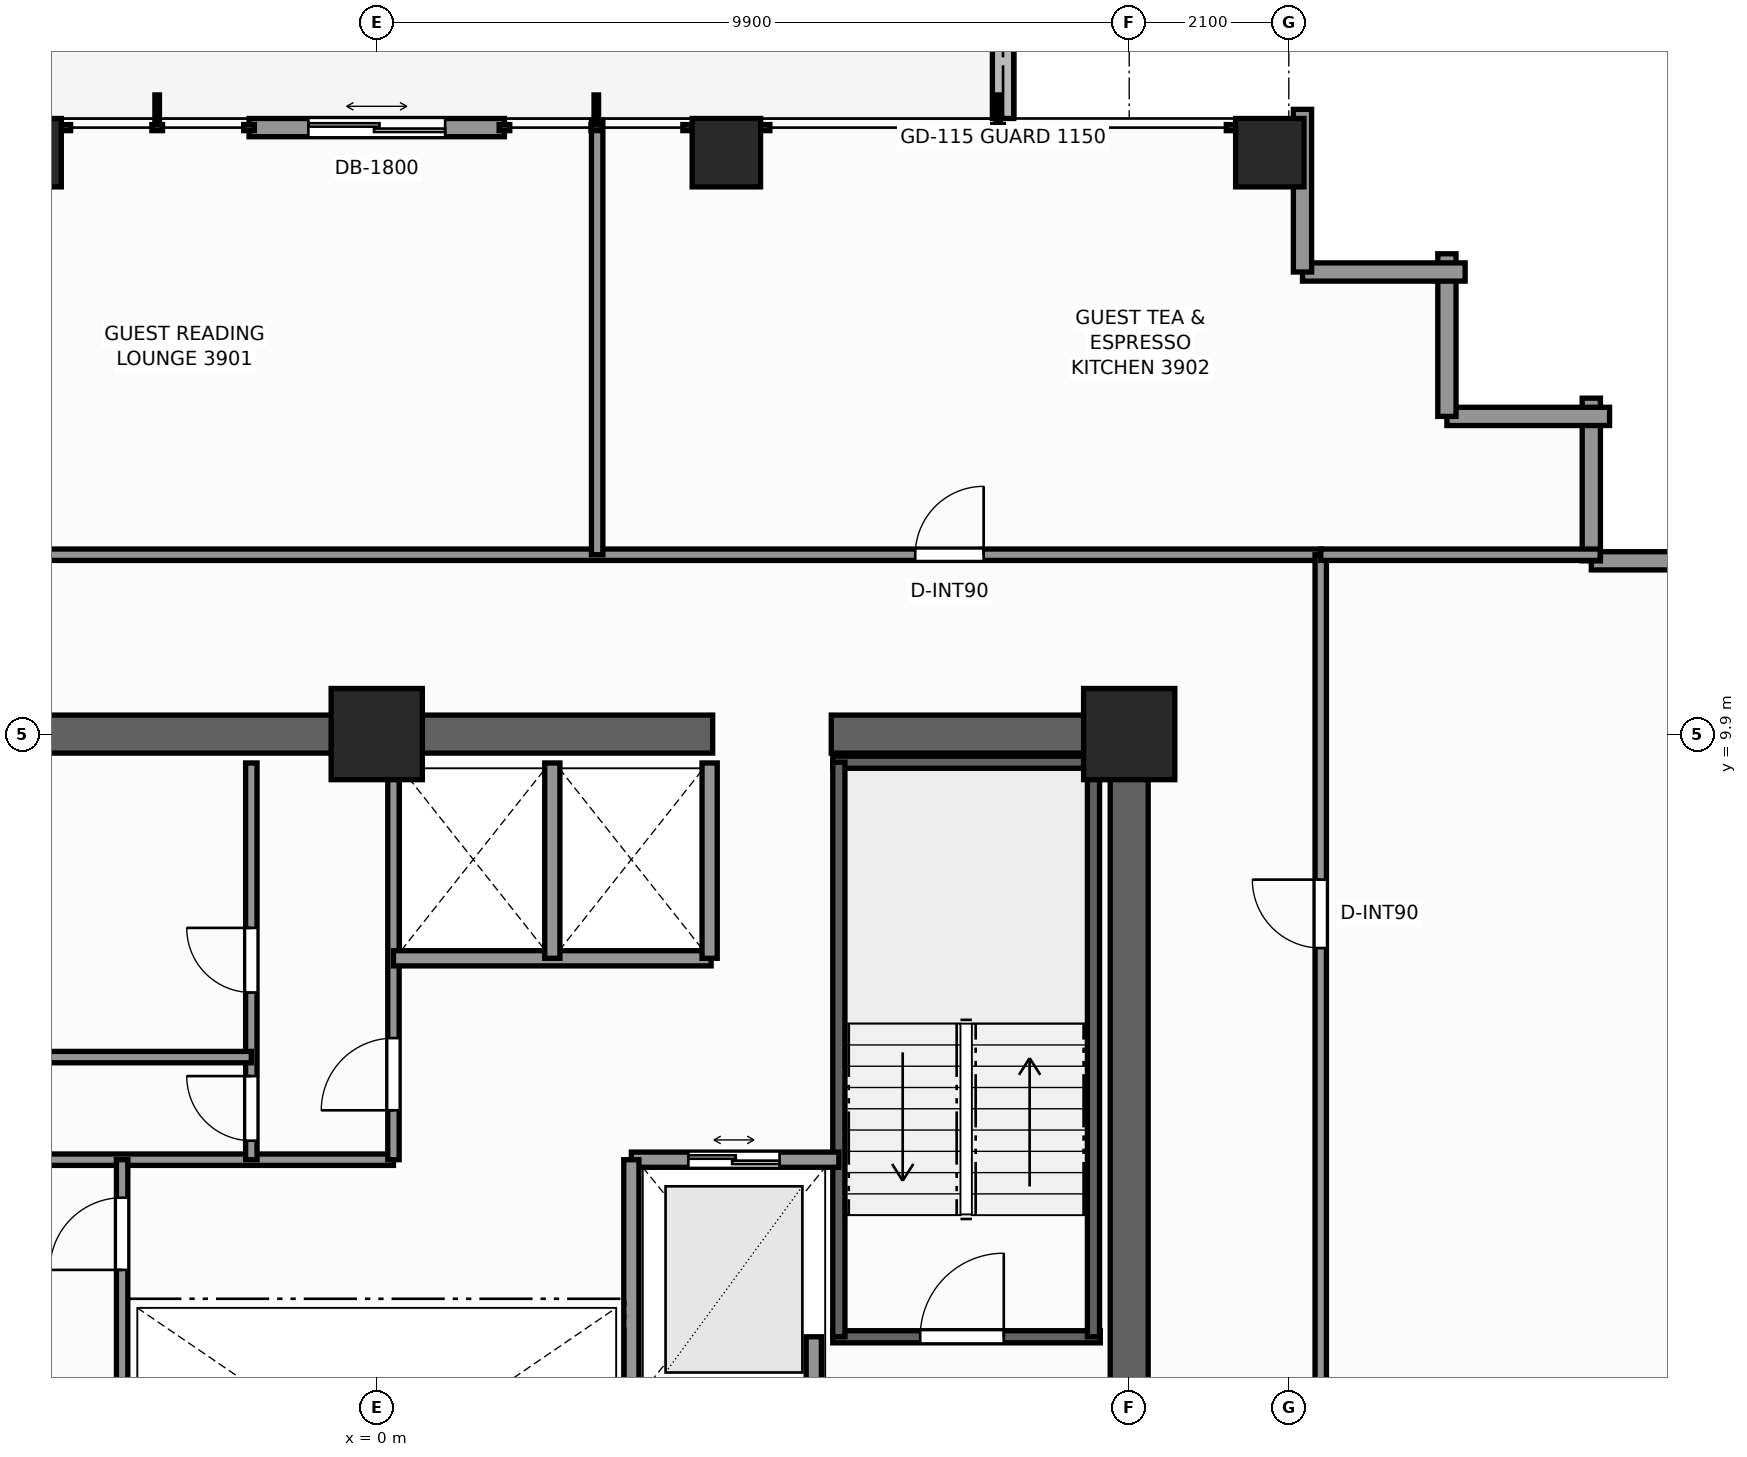
"""IFC4 building model, lengths in metres.
Left out: names, types, materials, properties, quantities, classifications, styles, units other than length and angle.
Written with IfcOpenShell. Run it as: python <this file> out.ifc"""

import sys

from ifc_helpers import new_model, si_unit, direction, frame, frame_2d, origin, origin_2d, place, context, subcontext, project, spatial, rectangle, extrude, element, fill, save


model = new_model("IFC4")
c1 = context("Model", 3, precision=1e-05, world=origin(), true_north=direction((0.0, 1.0)))
c2 = subcontext(c1, "Body", "Model", "MODEL_VIEW")
j1 = project(units=[si_unit("LENGTHUNIT", "METRE"), si_unit("PLANEANGLEUNIT", "RADIAN")], contexts=[c1])
p1 = place(None, origin())
s1 = spatial("IfcSite", under=j1, at=p1, CompositionType="ELEMENT")
p2 = place(p1, origin())
s2 = spatial("IfcBuilding", under=s1, at=p2, CompositionType="ELEMENT")
p3 = place(p2, frame((0.0, 0.0, 134.9)))
s3 = spatial("IfcBuildingStorey", under=s2, at=p3, CompositionType="ELEMENT", Elevation=134.9)
p4 = place(p3, frame((-10.15, 9.9, 0.0), z_axis=(0.0, 0.0, 1.0), x_axis=(1.0, 0.0, 0.0)))
e1 = element("IfcWall", 1, at=p4, inside=s3, PredefinedType="SHEAR", context=c2, shape_type="SweptSolid", body=[
    extrude(rectangle(XDim=14.57, YDim=0.5, at=frame_2d((7.285, 0.0))), origin(), (0.0, 0.0, 1.0), 3.3),
])
p5 = place(p3, frame((5.98, 9.9, 0.0), z_axis=(0.0, 0.0, 1.0), x_axis=(1.0, 0.0, 0.0)))
e2 = element("IfcWall", 2, at=p5, inside=s3, PredefinedType="SHEAR", context=c2, shape_type="SweptSolid", body=[
    extrude(rectangle(XDim=4.17, YDim=0.5, at=frame_2d((2.085, 0.0))), origin(), (0.0, 0.0, 1.0), 3.3),
])
p6 = place(p3, frame((9.9, -3.7, 0.0), z_axis=(0.0, 0.0, 1.0), x_axis=(0.0, 1.0, 0.0)))
e3 = element("IfcWall", 3, at=p6, inside=s3, PredefinedType="SHEAR", context=c2, shape_type="SweptSolid", body=[
    extrude(rectangle(XDim=13.35, YDim=0.5, at=frame_2d((6.675, 0.0))), origin(), (0.0, 0.0, 1.0), 3.3),
])
p7 = place(p6, frame((0.35, 0.0, 0.0)))
e4 = element("IfcOpeningElement", 4, at=p7, cuts=e3, PredefinedType="OPENING", context=c2, shape_type="SweptSolid", body=[
    extrude(rectangle(XDim=1.1, YDim=2.2, at=frame_2d((0.55, 1.1))), frame((0.0, 0.26, 0.0), z_axis=(0.0, -1.0, 0.0), x_axis=(1.0, 0.0, 0.0)), (0.0, 0.0, 1.0), 0.52),
])
for number, where, z_axis, x_axis in (
    (5, (9.9, 9.9, 0.0), (0.0, 0.0, 1.0), (1.0, 0.0, 0.0)),
    (6, (0.0, 9.9, 0.0), (0.0, 0.0, 1.0), (1.0, 0.0, 0.0)),
):
    element("IfcColumn", number, at=place(p3, frame(where, z_axis=z_axis, x_axis=x_axis)), inside=s3, PredefinedType="COLUMN", context=c2, shape_type="SweptSolid", body=[
        extrude(rectangle(XDim=1.2, YDim=1.2, at=origin_2d()), origin(), (0.0, 0.0, 1.0), 3.3),
    ])
for number, where, z_axis, x_axis in (
    (7, (-4.6, 17.55, 0.0), (0.0, 0.0, 1.0), (1.0, 0.0, 0.0)),
    (8, (4.6, 17.55, 0.0), (0.0, 0.0, 1.0), (1.0, 0.0, 0.0)),
    (9, (11.75, 17.55, 0.0), (0.0, 0.0, 1.0), (1.0, 0.0, 0.0)),
):
    element("IfcColumn", number, at=place(p3, frame(where, z_axis=z_axis, x_axis=x_axis)), inside=s3, PredefinedType="COLUMN", context=c2, shape_type="SweptSolid", body=[
        extrude(rectangle(XDim=0.9, YDim=0.9, at=origin_2d()), origin(), (0.0, 0.0, 1.0), 3.3),
    ])
p8 = place(p3, frame((8.24, 18.0, -0.02), z_axis=(0.0, 0.0, 1.0), x_axis=(0.0, 1.0, 0.0)))
e10 = element("IfcWall", 10, at=p8, inside=s3, PredefinedType="PARAPET", context=c2, shape_type="SweptSolid", body=[
    extrude(rectangle(XDim=2.975, YDim=0.28, at=frame_2d((1.487, 0.0))), origin(), (0.0, 0.0, 1.0), 0.42),
])
for number, where, z_axis, x_axis in (
    (11, (15.98, 12.18, 0.0), (0.0, 0.0, 1.0), (1.0, 0.0, 0.0)),
    (12, (15.98, 14.32, 0.0), (0.0, 0.0, 1.0), (0.0, -1.0, 0.0)),
):
    element("IfcWall", number, at=place(p3, frame(where, z_axis=z_axis, x_axis=x_axis)), inside=s3, PredefinedType="STANDARD", context=c2, shape_type="SweptSolid", body=[
        extrude(rectangle(XDim=2.14, YDim=0.24, at=frame_2d((1.07, 0.0))), origin(), (0.0, 0.0, 1.0), 2.479),
    ])
for number, where, z_axis, x_axis in (
    (13, (14.08, 14.08, 0.0), (0.0, 0.0, 1.0), (1.0, 0.0, 0.0)),
    (14, (14.08, 16.22, 0.0), (0.0, 0.0, 1.0), (0.0, -1.0, 0.0)),
):
    element("IfcWall", number, at=place(p3, frame(where, z_axis=z_axis, x_axis=x_axis)), inside=s3, PredefinedType="STANDARD", context=c2, shape_type="SweptSolid", body=[
        extrude(rectangle(XDim=2.14, YDim=0.24, at=frame_2d((1.07, 0.0))), origin(), (0.0, 0.0, 1.0), 2.479),
    ])
for number, where, z_axis, x_axis in (
    (15, (12.18, 15.98, 0.0), (0.0, 0.0, 1.0), (1.0, 0.0, 0.0)),
    (16, (12.18, 18.12, 0.0), (0.0, 0.0, 1.0), (0.0, -1.0, 0.0)),
):
    element("IfcWall", number, at=place(p3, frame(where, z_axis=z_axis, x_axis=x_axis)), inside=s3, PredefinedType="STANDARD", context=c2, shape_type="SweptSolid", body=[
        extrude(rectangle(XDim=2.14, YDim=0.24, at=frame_2d((1.07, 0.0))), origin(), (0.0, 0.0, 1.0), 2.479),
    ])
p9 = place(p3, frame((-1.68, 17.88, 0.0), z_axis=(0.0, 0.0, 1.0), x_axis=(1.0, 0.0, 0.0)))
e17 = element("IfcWall", 17, at=p9, inside=s3, PredefinedType="STANDARD", context=c2, shape_type="SweptSolid", body=[
    extrude(rectangle(XDim=3.36, YDim=0.24, at=frame_2d((1.68, 0.0))), origin(), (0.0, 0.0, 1.0), 3.1),
])
p10 = place(p9, frame((0.78, 0.0, 0.0)))
e18 = element("IfcOpeningElement", 18, at=p10, cuts=e17, PredefinedType="OPENING", context=c2, shape_type="SweptSolid", body=[
    extrude(rectangle(XDim=1.8, YDim=2.2, at=frame_2d((0.9, 1.1))), frame((0.0, 0.13, 0.0), z_axis=(0.0, -1.0, 0.0), x_axis=(1.0, 0.0, 0.0)), (0.0, 0.0, 1.0), 0.26),
])
p11 = place(p3, frame((6.0, 1.97, 0.0), z_axis=(0.0, 0.0, 1.0), x_axis=(1.0, 0.0, 0.0)))
e19 = element("IfcWall", 19, at=p11, inside=s3, PredefinedType="SHEAR", context=c2, shape_type="SweptSolid", body=[
    extrude(rectangle(XDim=3.52, YDim=0.16, at=frame_2d((1.76, 0.0))), origin(), (0.0, 0.0, 1.0), 3.3),
])
p12 = place(p11, frame((1.15, 0.0, 0.0)))
e20 = element("IfcOpeningElement", 20, at=p12, cuts=e19, PredefinedType="OPENING", context=c2, shape_type="SweptSolid", body=[
    extrude(rectangle(XDim=1.1, YDim=2.2, at=frame_2d((0.55, 1.1))), frame((0.0, 0.09, 0.0), z_axis=(0.0, -1.0, 0.0), x_axis=(1.0, 0.0, 0.0)), (0.0, 0.0, 1.0), 0.18),
])
p13 = place(p3, frame((6.0, 9.53, 0.0), z_axis=(0.0, 0.0, 1.0), x_axis=(1.0, 0.0, 0.0)))
e21 = element("IfcWall", 21, at=p13, inside=s3, PredefinedType="SHEAR", context=c2, shape_type="SweptSolid", body=[
    extrude(rectangle(XDim=3.52, YDim=0.16, at=frame_2d((1.76, 0.0))), origin(), (0.0, 0.0, 1.0), 3.3),
])
for number, where, z_axis, x_axis in (
    (22, (6.08, 1.97, 0.0), (0.0, 0.0, 1.0), (0.0, 1.0, 0.0)),
    (23, (9.43, 1.97, 0.0), (0.0, 0.0, 1.0), (0.0, 1.0, 0.0)),
):
    element("IfcWall", number, at=place(p3, frame(where, z_axis=z_axis, x_axis=x_axis)), inside=s3, PredefinedType="SHEAR", context=c2, shape_type="SweptSolid", body=[
        extrude(rectangle(XDim=7.56, YDim=0.16, at=frame_2d((3.78, 0.0))), origin(), (0.0, 0.0, 1.0), 3.3),
    ])
p14 = place(p3, frame((5.75, -3.6, 0.0), z_axis=(0.0, 0.0, 1.0), x_axis=(0.0, 1.0, 0.0)))
e24 = element("IfcWall", 24, at=p14, inside=s3, PredefinedType="SOLIDWALL", context=c2, shape_type="SweptSolid", body=[
    extrude(rectangle(XDim=5.57, YDim=0.2, at=frame_2d((2.785, 0.0))), origin(), (0.0, 0.0, 1.0), 2.735),
])
p15 = place(p14, frame((2.75, 0.0, 0.0)))
e25 = element("IfcOpeningElement", 25, at=p15, cuts=e24, PredefinedType="OPENING", context=c2, shape_type="SweptSolid", body=[
    extrude(rectangle(XDim=1.1, YDim=2.2, at=frame_2d((0.55, 1.1))), frame((0.0, 0.11, 0.0), z_axis=(0.0, -1.0, 0.0), x_axis=(1.0, 0.0, 0.0)), (0.0, 0.0, 1.0), 0.22),
])
p16 = place(p3, frame((3.35, 4.3, 0.0), z_axis=(0.0, 0.0, 1.0), x_axis=(1.0, 0.0, 0.0)))
e26 = element("IfcWall", 26, at=p16, inside=s3, PredefinedType="SOLIDWALL", context=c2, shape_type="SweptSolid", body=[
    extrude(rectangle(XDim=2.73, YDim=0.2, at=frame_2d((1.365, 0.0))), origin(), (0.0, 0.0, 1.0), 3.1),
])
p17 = place(p16, frame((0.75, 0.0, 0.0)))
e27 = element("IfcOpeningElement", 27, at=p17, cuts=e26, PredefinedType="OPENING", context=c2, shape_type="SweptSolid", body=[
    extrude(rectangle(XDim=1.2, YDim=2.25, at=frame_2d((0.6, 1.125))), frame((0.0, 0.11, 0.0), z_axis=(0.0, -1.0, 0.0), x_axis=(1.0, 0.0, 0.0)), (0.0, 0.0, 1.0), 0.22),
])
p18 = place(p3, frame((3.35, 1.1, 0.0), z_axis=(0.0, 0.0, 1.0), x_axis=(0.0, 1.0, 0.0)))
e28 = element("IfcWall", 28, at=p18, inside=s3, PredefinedType="SOLIDWALL", context=c2, shape_type="SweptSolid", body=[
    extrude(rectangle(XDim=3.2, YDim=0.2, at=frame_2d((1.6, 0.0))), origin(), (0.0, 0.0, 1.0), 2.735),
])
p19 = place(p3, frame((-6.08, 4.3, 0.0), z_axis=(0.0, 0.0, 1.0), x_axis=(1.0, 0.0, 0.0)))
e29 = element("IfcWall", 29, at=p19, inside=s3, PredefinedType="PARTITIONING", context=c2, shape_type="SweptSolid", body=[
    extrude(rectangle(XDim=6.3, YDim=0.15, at=frame_2d((3.15, 0.0))), origin(), (0.0, 0.0, 1.0), 3.1),
])
p20 = place(p3, frame((0.22, 4.3, 0.0), z_axis=(0.0, 0.0, 1.0), x_axis=(0.0, 1.0, 0.0)))
e30 = element("IfcWall", 30, at=p20, inside=s3, PredefinedType="PARTITIONING", context=c2, shape_type="SweptSolid", body=[
    extrude(rectangle(XDim=5.22, YDim=0.15, at=frame_2d((2.61, 0.0))), origin(), (0.0, 0.0, 1.0), 3.1),
])
p21 = place(p20, frame((0.65, 0.0, 0.0)))
e31 = element("IfcOpeningElement", 31, at=p21, cuts=e30, PredefinedType="OPENING", context=c2, shape_type="SweptSolid", body=[
    extrude(rectangle(XDim=0.95, YDim=2.06, at=frame_2d((0.475, 1.03))), frame((0.0, 0.085, 0.0), z_axis=(0.0, -1.0, 0.0), x_axis=(1.0, 0.0, 0.0)), (0.0, 0.0, 1.0), 0.17),
])
p22 = place(p3, frame((-1.65, 4.3, 0.0), z_axis=(0.0, 0.0, 1.0), x_axis=(0.0, 1.0, 0.0)))
e32 = element("IfcWall", 32, at=p22, inside=s3, PredefinedType="PARTITIONING", context=c2, shape_type="SweptSolid", body=[
    extrude(rectangle(XDim=5.22, YDim=0.15, at=frame_2d((2.61, 0.0))), origin(), (0.0, 0.0, 1.0), 3.1),
])
p23 = place(p22, frame((2.2, 0.0, 0.0)))
e33 = element("IfcOpeningElement", 33, at=p23, cuts=e32, PredefinedType="OPENING", context=c2, shape_type="SweptSolid", body=[
    extrude(rectangle(XDim=0.85, YDim=2.03, at=frame_2d((0.425, 1.015))), frame((0.0, 0.085, 0.0), z_axis=(0.0, -1.0, 0.0), x_axis=(1.0, 0.0, 0.0)), (0.0, 0.0, 1.0), 0.17),
])
p24 = place(p22, frame((0.25, 0.0, 0.0)))
e34 = element("IfcOpeningElement", 34, at=p24, cuts=e32, PredefinedType="OPENING", context=c2, shape_type="SweptSolid", body=[
    extrude(rectangle(XDim=0.85, YDim=2.03, at=frame_2d((0.425, 1.015))), frame((0.0, 0.085, 0.0), z_axis=(0.0, -1.0, 0.0), x_axis=(1.0, 0.0, 0.0)), (0.0, 0.0, 1.0), 0.17),
])
p25 = place(p3, frame((-6.08, 5.65, 0.0), z_axis=(0.0, 0.0, 1.0), x_axis=(1.0, 0.0, 0.0)))
e35 = element("IfcWall", 35, at=p25, inside=s3, PredefinedType="PARTITIONING", context=c2, shape_type="SweptSolid", body=[
    extrude(rectangle(XDim=4.43, YDim=0.15, at=frame_2d((2.215, 0.0))), origin(), (0.0, 0.0, 1.0), 3.1),
])
p26 = place(p3, frame((0.22, 6.95, 0.0), z_axis=(0.0, 0.0, 1.0), x_axis=(1.0, 0.0, 0.0)))
e36 = element("IfcWall", 36, at=p26, inside=s3, PredefinedType="SOLIDWALL", context=c2, shape_type="SweptSolid", body=[
    extrude(rectangle(XDim=4.18, YDim=0.2, at=frame_2d((2.09, 0.0))), origin(), (0.0, 0.0, 1.0), 3.1),
])
for number, where, z_axis, x_axis in (
    (37, (4.38, 6.95, 0.0), (0.0, 0.0, 1.0), (0.0, 1.0, 0.0)),
    (38, (2.31, 6.95, 0.0), (0.0, 0.0, 1.0), (0.0, 1.0, 0.0)),
):
    element("IfcWall", number, at=place(p3, frame(where, z_axis=z_axis, x_axis=x_axis)), inside=s3, PredefinedType="SOLIDWALL", context=c2, shape_type="SweptSolid", body=[
        extrude(rectangle(XDim=2.57, YDim=0.2, at=frame_2d((1.285, 0.0))), origin(), (0.0, 0.0, 1.0), 3.1),
    ])
p27 = place(p3, frame((-3.35, 1.1, 0.0), z_axis=(0.0, 0.0, 1.0), x_axis=(0.0, 1.0, 0.0)))
e39 = element("IfcWall", 39, at=p27, inside=s3, PredefinedType="PARTITIONING", context=c2, shape_type="SweptSolid", body=[
    extrude(rectangle(XDim=3.2, YDim=0.15, at=frame_2d((1.6, 0.0))), origin(), (0.0, 0.0, 1.0), 2.735),
])
p28 = place(p27, frame((1.75, 0.0, 0.0)))
e40 = element("IfcOpeningElement", 40, at=p28, cuts=e39, PredefinedType="OPENING", context=c2, shape_type="SweptSolid", body=[
    extrude(rectangle(XDim=0.95, YDim=2.06, at=frame_2d((0.475, 1.03))), frame((0.0, 0.085, 0.0), z_axis=(0.0, -1.0, 0.0), x_axis=(1.0, 0.0, 0.0)), (0.0, 0.0, 1.0), 0.17),
])
p29 = place(p3, frame((-12.26, 12.26, 0.0), z_axis=(0.0, 0.0, 1.0), x_axis=(1.0, 0.0, 0.0)))
e41 = element("IfcWall", 41, at=p29, inside=s3, PredefinedType="PARTITIONING", context=c2, shape_type="SweptSolid", body=[
    extrude(rectangle(XDim=24.68, YDim=0.15, at=frame_2d((12.34, 0.0))), origin(), (0.0, 0.0, 1.0), 2.312),
])
p30 = place(p29, frame((4.275, 0.0, 0.0)))
e42 = element("IfcOpeningElement", 42, at=p30, cuts=e41, PredefinedType="OPENING", context=c2, shape_type="SweptSolid", body=[
    extrude(rectangle(XDim=0.9, YDim=2.06, at=frame_2d((0.45, 1.03))), frame((0.0, 0.085, 0.0), z_axis=(0.0, -1.0, 0.0), x_axis=(1.0, 0.0, 0.0)), (0.0, 0.0, 1.0), 0.17),
])
p31 = place(p29, frame((19.345, 0.0, 0.0)))
e43 = element("IfcOpeningElement", 43, at=p31, cuts=e41, PredefinedType="OPENING", context=c2, shape_type="SweptSolid", body=[
    extrude(rectangle(XDim=0.9, YDim=2.06, at=frame_2d((0.45, 1.03))), frame((0.0, 0.085, 0.0), z_axis=(0.0, -1.0, 0.0), x_axis=(1.0, 0.0, 0.0)), (0.0, 0.0, 1.0), 0.17),
])
p32 = place(p3, frame((12.42, -12.58, 0.0), z_axis=(0.0, 0.0, 1.0), x_axis=(0.0, 1.0, 0.0)))
e44 = element("IfcWall", 44, at=p32, inside=s3, PredefinedType="PARTITIONING", context=c2, shape_type="SweptSolid", body=[
    extrude(rectangle(XDim=24.84, YDim=0.15, at=frame_2d((12.42, 0.0))), origin(), (0.0, 0.0, 1.0), 2.312),
])
p33 = place(p32, frame((4.595, 0.0, 0.0)))
e45 = element("IfcOpeningElement", 45, at=p33, cuts=e44, PredefinedType="OPENING", context=c2, shape_type="SweptSolid", body=[
    extrude(rectangle(XDim=0.9, YDim=2.06, at=frame_2d((0.45, 1.03))), frame((0.0, 0.085, 0.0), z_axis=(0.0, -1.0, 0.0), x_axis=(1.0, 0.0, 0.0)), (0.0, 0.0, 1.0), 0.17),
])
p34 = place(p32, frame((19.665, 0.0, 0.0)))
e46 = element("IfcOpeningElement", 46, at=p34, cuts=e44, PredefinedType="OPENING", context=c2, shape_type="SweptSolid", body=[
    extrude(rectangle(XDim=0.9, YDim=2.06, at=frame_2d((0.45, 1.03))), frame((0.0, 0.085, 0.0), z_axis=(0.0, -1.0, 0.0), x_axis=(1.0, 0.0, 0.0)), (0.0, 0.0, 1.0), 0.17),
])
p35 = place(p3, frame((12.42, 12.26, 0.0), z_axis=(0.0, 0.0, 1.0), x_axis=(1.0, 0.0, 0.0)))
e47 = element("IfcWall", 47, at=p35, inside=s3, PredefinedType="PARTITIONING", context=c2, shape_type="SweptSolid", body=[
    extrude(rectangle(XDim=3.676, YDim=0.15, at=frame_2d((1.838, 0.0))), origin(), (0.0, 0.0, 1.0), 3.1),
])
p36 = place(p3, frame((2.9, 12.26, 0.0), z_axis=(0.0, 0.0, 1.0), x_axis=(0.0, 1.0, 0.0)))
e48 = element("IfcWall", 48, at=p36, inside=s3, PredefinedType="PARTITIONING", context=c2, shape_type="SweptSolid", body=[
    extrude(rectangle(XDim=5.72, YDim=0.15, at=frame_2d((2.86, 0.0))), origin(), (0.0, 0.0, 1.0), 2.389),
])
p37 = place(p10, origin())
e49 = element("IfcDoor", 49, at=p37, inside=s3, OperationType="DOUBLE_DOOR_SLIDING", PredefinedType="DOOR", context=c2, shape_type="SweptSolid", body=[
    extrude(rectangle(XDim=1.8, YDim=2.2, at=frame_2d((0.9, 1.1))), frame((0.0, 0.025, 0.0), z_axis=(0.0, -1.0, 0.0), x_axis=(1.0, 0.0, 0.0)), (0.0, 0.0, 1.0), 0.05),
])
fill(e18, e49)
p38 = place(p12, origin())
e50 = element("IfcDoor", 50, at=p38, inside=s3, OperationType="SINGLE_SWING_RIGHT", PredefinedType="DOOR", context=c2, shape_type="SweptSolid", body=[
    extrude(rectangle(XDim=1.1, YDim=2.2, at=frame_2d((0.55, 1.1))), frame((0.0, 0.025, 0.0), z_axis=(0.0, -1.0, 0.0), x_axis=(1.0, 0.0, 0.0)), (0.0, 0.0, 1.0), 0.05),
])
fill(e20, e50)
p39 = place(p17, origin())
e51 = element("IfcDoor", 51, at=p39, inside=s3, OperationType="DOUBLE_DOOR_SLIDING", PredefinedType="DOOR", context=c2, shape_type="SweptSolid", body=[
    extrude(rectangle(XDim=1.2, YDim=2.25, at=frame_2d((0.6, 1.125))), frame((0.0, 0.025, 0.0), z_axis=(0.0, -1.0, 0.0), x_axis=(1.0, 0.0, 0.0)), (0.0, 0.0, 1.0), 0.05),
])
fill(e27, e51)
p40 = place(p21, origin())
e52 = element("IfcDoor", 52, at=p40, inside=s3, OperationType="SINGLE_SWING_LEFT", PredefinedType="DOOR", context=c2, shape_type="SweptSolid", body=[
    extrude(rectangle(XDim=0.95, YDim=2.06, at=frame_2d((0.475, 1.03))), frame((0.0, 0.025, 0.0), z_axis=(0.0, -1.0, 0.0), x_axis=(1.0, 0.0, 0.0)), (0.0, 0.0, 1.0), 0.05),
])
fill(e31, e52)
p41 = place(p23, origin())
e53 = element("IfcDoor", 53, at=p41, inside=s3, OperationType="SINGLE_SWING_RIGHT", PredefinedType="DOOR", context=c2, shape_type="SweptSolid", body=[
    extrude(rectangle(XDim=0.85, YDim=2.03, at=frame_2d((0.425, 1.015))), frame((0.0, 0.025, 0.0), z_axis=(0.0, -1.0, 0.0), x_axis=(1.0, 0.0, 0.0)), (0.0, 0.0, 1.0), 0.05),
])
fill(e33, e53)
p42 = place(p24, origin())
e54 = element("IfcDoor", 54, at=p42, inside=s3, OperationType="SINGLE_SWING_RIGHT", PredefinedType="DOOR", context=c2, shape_type="SweptSolid", body=[
    extrude(rectangle(XDim=0.85, YDim=2.03, at=frame_2d((0.425, 1.015))), frame((0.0, 0.025, 0.0), z_axis=(0.0, -1.0, 0.0), x_axis=(1.0, 0.0, 0.0)), (0.0, 0.0, 1.0), 0.05),
])
fill(e34, e54)
p43 = place(p28, origin())
e55 = element("IfcDoor", 55, at=p43, inside=s3, OperationType="SINGLE_SWING_LEFT", PredefinedType="DOOR", context=c2, shape_type="SweptSolid", body=[
    extrude(rectangle(XDim=0.95, YDim=2.06, at=frame_2d((0.475, 1.03))), frame((0.0, 0.025, 0.0), z_axis=(0.0, -1.0, 0.0), x_axis=(1.0, 0.0, 0.0)), (0.0, 0.0, 1.0), 0.05),
])
fill(e40, e55)
p44 = place(p31, origin())
e56 = element("IfcDoor", 56, at=p44, inside=s3, OperationType="SINGLE_SWING_RIGHT", PredefinedType="DOOR", context=c2, shape_type="SweptSolid", body=[
    extrude(rectangle(XDim=0.9, YDim=2.06, at=frame_2d((0.45, 1.03))), frame((0.0, 0.025, 0.0), z_axis=(0.0, -1.0, 0.0), x_axis=(1.0, 0.0, 0.0)), (0.0, 0.0, 1.0), 0.05),
])
fill(e43, e56)
p45 = place(p34, origin())
e57 = element("IfcDoor", 57, at=p45, inside=s3, OperationType="SINGLE_SWING_RIGHT", PredefinedType="DOOR", context=c2, shape_type="SweptSolid", body=[
    extrude(rectangle(XDim=0.9, YDim=2.06, at=frame_2d((0.45, 1.03))), frame((0.0, 0.025, 0.0), z_axis=(0.0, -1.0, 0.0), x_axis=(1.0, 0.0, 0.0)), (0.0, 0.0, 1.0), 0.05),
])
fill(e46, e57)
save(model, sys.argv[1])
